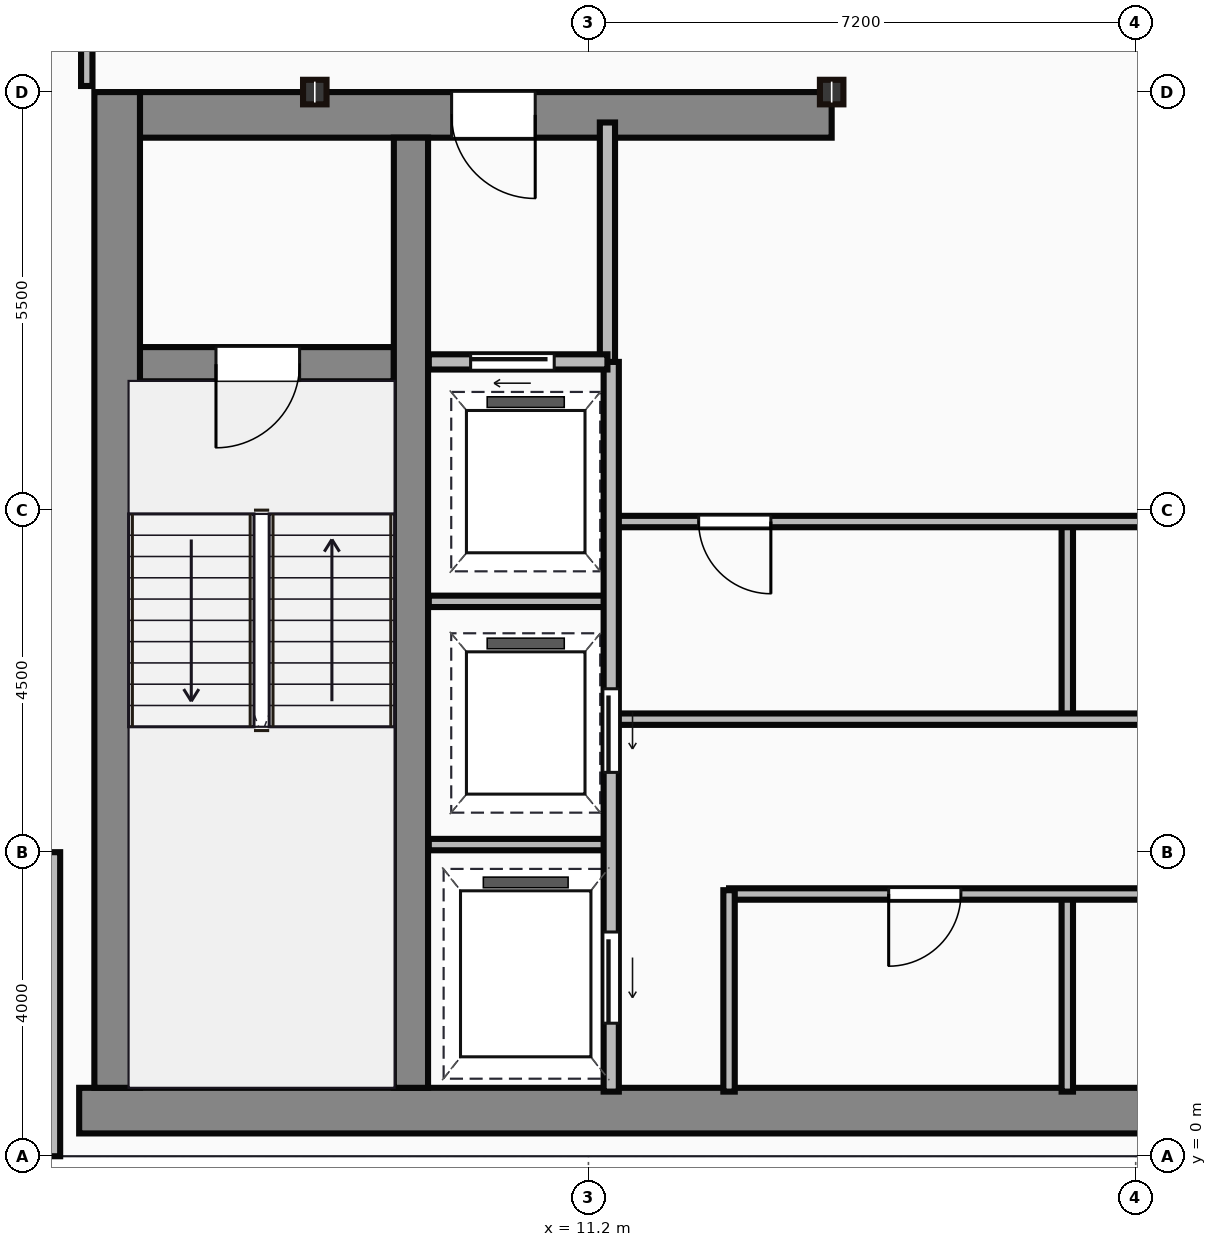
"""IFC4 building model, lengths in metres.
Left out: names, types, materials, properties, quantities, classifications, styles, units other than length and angle.
Written with IfcOpenShell. Run it as: python <this file> out.ifc"""

import sys

from ifc_helpers import new_model, si_unit, direction, frame, frame_2d, origin, origin_2d, place, context, subcontext, project, spatial, rectangle, i_section, extrude, source, transform, mapped, element, fill, save


model = new_model("IFC4")
c1 = context("Model", 3, precision=1e-05, world=origin(), true_north=direction((0.0, 1.0)))
c2 = subcontext(c1, "Body", "Model", "MODEL_VIEW")
j1 = project(units=[si_unit("LENGTHUNIT", "METRE"), si_unit("PLANEANGLEUNIT", "RADIAN")], contexts=[c1])
p1 = place(None, origin())
s1 = spatial("IfcSite", under=j1, at=p1, CompositionType="ELEMENT")
p2 = place(p1, origin())
s2 = spatial("IfcBuilding", under=s1, at=p2, CompositionType="ELEMENT")
p3 = place(p2, frame((0.0, 0.0, 232.4)))
s3 = spatial("IfcBuildingStorey", under=s2, at=p3, CompositionType="ELEMENT", Elevation=232.4)
m1 = source(origin(), c2, "Body", "SweptSolid", [
    extrude(rectangle(XDim=29.5, YDim=0.6, at=frame_2d((14.75, 0.0))), origin(), (0.0, 0.0, 1.0), 3.65),
])
p4 = place(p3, frame((4.5, 0.6, 0.0), z_axis=(0.0, 0.0, 1.0), x_axis=(1.0, 0.0, 0.0)))
e1 = element("IfcWall", 1, at=p4, inside=s3, PredefinedType="SHEAR", context=c2, shape_type="MappedRepresentation", body=[
    mapped(m1, transform((0.0, 0.0, 0.0))),
])
m2 = source(origin(), c2, "Body", "SweptSolid", [
    extrude(rectangle(XDim=13.1, YDim=0.6, at=frame_2d((6.55, 0.0))), origin(), (0.0, 0.0, 1.0), 3.65),
])
p5 = place(p3, frame((5.0, 0.9, 0.0), z_axis=(0.0, 0.0, 1.0), x_axis=(0.0, 1.0, 0.0)))
e2 = element("IfcWall", 2, at=p5, inside=s3, PredefinedType="SHEAR", context=c2, shape_type="MappedRepresentation", body=[
    mapped(m2, transform((0.0, 0.0, 0.0))),
])
m3 = source(origin(), c2, "Body", "SweptSolid", [
    extrude(rectangle(XDim=9.1, YDim=0.6, at=frame_2d((4.55, 0.0))), origin(), (0.0, 0.0, 1.0), 3.65),
])
p6 = place(p3, frame((5.3, 13.7, 0.0), z_axis=(0.0, 0.0, 1.0), x_axis=(1.0, 0.0, 0.0)))
e3 = element("IfcWall", 3, at=p6, inside=s3, PredefinedType="SHEAR", context=c2, shape_type="MappedRepresentation", body=[
    mapped(m3, transform((0.0, 0.0, 0.0))),
])
p7 = place(p6, frame((4.1, 0.0, 0.0)))
e4 = element("IfcOpeningElement", 4, at=p7, cuts=e3, PredefinedType="OPENING", context=c2, shape_type="SweptSolid", body=[
    extrude(rectangle(XDim=1.1, YDim=2.15, at=frame_2d((0.55, 1.075))), frame((0.0, 0.31, 0.0), z_axis=(0.0, -1.0, 0.0), x_axis=(1.0, 0.0, 0.0)), (0.0, 0.0, 1.0), 0.62),
])
m4 = source(origin(), c2, "Body", "SweptSolid", [
    extrude(rectangle(XDim=12.5, YDim=0.45, at=frame_2d((6.25, 0.0))), origin(), (0.0, 0.0, 1.0), 3.65),
])
p8 = place(p3, frame((8.865, 0.9, 0.0), z_axis=(0.0, 0.0, 1.0), x_axis=(0.0, 1.0, 0.0)))
e5 = element("IfcWall", 5, at=p8, inside=s3, PredefinedType="SHEAR", context=c2, shape_type="MappedRepresentation", body=[
    mapped(m4, transform((0.0, 0.0, 0.0))),
])
m5 = source(origin(), c2, "Body", "SweptSolid", [
    extrude(rectangle(XDim=3.39, YDim=0.45, at=frame_2d((1.695, 0.0))), origin(), (0.0, 0.0, 1.0), 3.65),
])
p9 = place(p3, frame((5.25, 10.42, 0.0), z_axis=(0.0, 0.0, 1.0), x_axis=(1.0, 0.0, 0.0)))
e6 = element("IfcWall", 6, at=p9, inside=s3, PredefinedType="SHEAR", context=c2, shape_type="MappedRepresentation", body=[
    mapped(m5, transform((0.0, 0.0, 0.0))),
])
p10 = place(p9, frame((1.05, 0.0, 0.0)))
e7 = element("IfcOpeningElement", 7, at=p10, cuts=e6, PredefinedType="OPENING", context=c2, shape_type="SweptSolid", body=[
    extrude(rectangle(XDim=1.1, YDim=2.15, at=frame_2d((0.55, 1.075))), frame((0.0, 0.235, 0.0), z_axis=(0.0, -1.0, 0.0), x_axis=(1.0, 0.0, 0.0)), (0.0, 0.0, 1.0), 0.47),
])
m6 = source(origin(), c2, "Body", "SweptSolid", [
    extrude(i_section(OverallWidth=0.309, OverallDepth=0.323, WebThickness=0.014, FlangeThickness=0.023, at=origin_2d()), origin(), (0.0, 0.0, 1.0), 3.65),
])
for number, where, z_axis, x_axis in (
    (8, (7.6, 14.0, 0.0), (0.0, 0.0, 1.0), (1.0, 0.0, 0.0)),
    (9, (14.4, 14.0, 0.0), (0.0, 0.0, 1.0), (1.0, 0.0, 0.0)),
):
    element("IfcColumn", number, at=place(p3, frame(where, z_axis=z_axis, x_axis=x_axis)), inside=s3, PredefinedType="COLUMN", context=c2, shape_type="MappedRepresentation", body=[
        mapped(m6, transform((0.0, 0.0, 0.0))),
    ])
m7 = source(origin(), c2, "Body", "SweptSolid", [
    extrude(rectangle(XDim=4.0, YDim=0.25, at=frame_2d((2.0, 0.0))), origin(), (0.0, 0.0, 1.0), 3.35),
])
p11 = place(p3, frame((4.125, 4.0, 0.0), z_axis=(0.0, 0.0, 1.0), x_axis=(0.0, -1.0, 0.0)))
e10 = element("IfcWall", 10, at=p11, inside=s3, PredefinedType="STANDARD", context=c2, shape_type="MappedRepresentation", body=[
    mapped(m7, transform((0.0, 0.0, 0.0))),
])
m8 = source(origin(), c2, "Body", "SweptSolid", [
    extrude(rectangle(XDim=3.18, YDim=0.2, at=frame_2d((1.59, 0.0))), origin(), (0.0, 0.0, 1.0), 3.35),
])
p12 = place(p3, frame((11.45, 10.42, 0.0), z_axis=(0.0, 0.0, 1.0), x_axis=(0.0, 1.0, 0.0)))
e11 = element("IfcWall", 11, at=p12, inside=s3, PredefinedType="PARTITIONING", context=c2, shape_type="MappedRepresentation", body=[
    mapped(m8, transform((0.0, 0.0, 0.0))),
])
m9 = source(origin(), c2, "Body", "SweptSolid", [
    extrude(rectangle(XDim=2.35, YDim=0.2, at=frame_2d((1.175, 0.0))), origin(), (0.0, 0.0, 1.0), 3.35),
])
p13 = place(p3, frame((9.1, 10.45, 0.0), z_axis=(0.0, 0.0, 1.0), x_axis=(1.0, 0.0, 0.0)))
e12 = element("IfcWall", 12, at=p13, inside=s3, PredefinedType="PARTITIONING", context=c2, shape_type="MappedRepresentation", body=[
    mapped(m9, transform((0.0, 0.0, 0.0))),
])
p14 = place(p13, frame((0.55, 0.0, 0.0)))
e13 = element("IfcOpeningElement", 13, at=p14, cuts=e12, PredefinedType="OPENING", context=c2, shape_type="SweptSolid", body=[
    extrude(rectangle(XDim=1.1, YDim=2.15, at=frame_2d((0.55, 1.075))), frame((0.0, 0.11, 0.0), z_axis=(0.0, -1.0, 0.0), x_axis=(1.0, 0.0, 0.0)), (0.0, 0.0, 1.0), 0.22),
])
m10 = source(origin(), c2, "Body", "SweptSolid", [
    extrude(rectangle(XDim=9.6, YDim=0.2, at=frame_2d((4.8, 0.0))), origin(), (0.0, 0.0, 1.0), 3.35),
])
p15 = place(p3, frame((11.5, 0.85, 0.0), z_axis=(0.0, 0.0, 1.0), x_axis=(0.0, 1.0, 0.0)))
e14 = element("IfcWall", 14, at=p15, inside=s3, PredefinedType="PARTITIONING", context=c2, shape_type="MappedRepresentation", body=[
    mapped(m10, transform((0.0, 0.0, 0.0))),
])
p16 = place(p15, frame((4.2, 0.0, 0.0)))
e15 = element("IfcOpeningElement", 15, at=p16, cuts=e14, PredefinedType="OPENING", context=c2, shape_type="SweptSolid", body=[
    extrude(rectangle(XDim=1.1, YDim=2.15, at=frame_2d((0.55, 1.075))), frame((0.0, 0.11, 0.0), z_axis=(0.0, -1.0, 0.0), x_axis=(1.0, 0.0, 0.0)), (0.0, 0.0, 1.0), 0.22),
])
p17 = place(p15, frame((0.9, 0.0, 0.0)))
e16 = element("IfcOpeningElement", 16, at=p17, cuts=e14, PredefinedType="OPENING", context=c2, shape_type="SweptSolid", body=[
    extrude(rectangle(XDim=1.2, YDim=2.15, at=frame_2d((0.6, 1.075))), frame((0.0, 0.11, 0.0), z_axis=(0.0, -1.0, 0.0), x_axis=(1.0, 0.0, 0.0)), (0.0, 0.0, 1.0), 0.22),
])
m11 = source(origin(), c2, "Body", "SweptSolid", [
    extrude(rectangle(XDim=2.4, YDim=0.15, at=frame_2d((1.2, 0.0))), origin(), (0.0, 0.0, 1.0), 3.35),
])
for number, where, z_axis, x_axis in (
    (17, (9.1, 4.1, 0.0), (0.0, 0.0, 1.0), (1.0, 0.0, 0.0)),
    (18, (9.1, 7.3, 0.0), (0.0, 0.0, 1.0), (1.0, 0.0, 0.0)),
):
    element("IfcWall", number, at=place(p3, frame(where, z_axis=z_axis, x_axis=x_axis)), inside=s3, PredefinedType="PARTITIONING", context=c2, shape_type="MappedRepresentation", body=[
        mapped(m11, transform((0.0, 0.0, 0.0))),
    ])
m12 = source(origin(), c2, "Body", "SweptSolid", [
    extrude(rectangle(XDim=2.65, YDim=0.15, at=frame_2d((1.325, 0.0))), origin(), (0.0, 0.0, 1.0), 3.35),
])
p18 = place(p3, frame((13.05, 0.85, 0.0), z_axis=(0.0, 0.0, 1.0), x_axis=(0.0, 1.0, 0.0)))
e19 = element("IfcWall", 19, at=p18, inside=s3, PredefinedType="PARTITIONING", context=c2, shape_type="MappedRepresentation", body=[
    mapped(m12, transform((0.0, 0.0, 0.0))),
])
m13 = source(origin(), c2, "Body", "SweptSolid", [
    extrude(rectangle(XDim=10.35, YDim=0.15, at=frame_2d((5.175, 0.0))), origin(), (0.0, 0.0, 1.0), 3.35),
])
p19 = place(p3, frame((13.05, 3.45, 0.0), z_axis=(0.0, 0.0, 1.0), x_axis=(1.0, 0.0, 0.0)))
e20 = element("IfcWall", 20, at=p19, inside=s3, PredefinedType="PARTITIONING", context=c2, shape_type="MappedRepresentation", body=[
    mapped(m13, transform((0.0, 0.0, 0.0))),
])
p20 = place(p19, frame((2.1, 0.0, 0.0)))
e21 = element("IfcOpeningElement", 21, at=p20, cuts=e20, PredefinedType="OPENING", context=c2, shape_type="SweptSolid", body=[
    extrude(rectangle(XDim=0.95, YDim=2.15, at=frame_2d((0.475, 1.075))), frame((0.0, 0.085, 0.0), z_axis=(0.0, -1.0, 0.0), x_axis=(1.0, 0.0, 0.0)), (0.0, 0.0, 1.0), 0.17),
])
p21 = place(p19, frame((6.8, 0.0, 0.0)))
e22 = element("IfcOpeningElement", 22, at=p21, cuts=e20, PredefinedType="OPENING", context=c2, shape_type="SweptSolid", body=[
    extrude(rectangle(XDim=0.95, YDim=2.15, at=frame_2d((0.475, 1.075))), frame((0.0, 0.085, 0.0), z_axis=(0.0, -1.0, 0.0), x_axis=(1.0, 0.0, 0.0)), (0.0, 0.0, 1.0), 0.17),
])
m14 = source(origin(), c2, "Body", "SweptSolid", [
    extrude(rectangle(XDim=2.6, YDim=0.15, at=frame_2d((1.3, 0.0))), origin(), (0.0, 0.0, 1.0), 3.35),
])
p22 = place(p3, frame((17.5, 0.85, 0.0), z_axis=(0.0, 0.0, 1.0), x_axis=(0.0, 1.0, 0.0)))
e23 = element("IfcWall", 23, at=p22, inside=s3, PredefinedType="PARTITIONING", context=c2, shape_type="MappedRepresentation", body=[
    mapped(m14, transform((0.0, 0.0, 0.0))),
])
m15 = source(origin(), c2, "Body", "SweptSolid", [
    extrude(rectangle(XDim=11.85, YDim=0.15, at=frame_2d((5.925, 0.0))), origin(), (0.0, 0.0, 1.0), 3.35),
])
p23 = place(p3, frame((11.55, 5.75, 0.0), z_axis=(0.0, 0.0, 1.0), x_axis=(1.0, 0.0, 0.0)))
e24 = element("IfcWall", 24, at=p23, inside=s3, PredefinedType="PARTITIONING", context=c2, shape_type="MappedRepresentation", body=[
    mapped(m15, transform((0.0, 0.0, 0.0))),
])
p24 = place(p3, frame((11.55, 8.35, 0.0), z_axis=(0.0, 0.0, 1.0), x_axis=(1.0, 0.0, 0.0)))
e25 = element("IfcWall", 25, at=p24, inside=s3, PredefinedType="PARTITIONING", context=c2, shape_type="MappedRepresentation", body=[
    mapped(m15, transform((0.0, 0.0, 0.0))),
])
p25 = place(p24, frame((1.1, 0.0, 0.0)))
e26 = element("IfcOpeningElement", 26, at=p25, cuts=e25, PredefinedType="OPENING", context=c2, shape_type="SweptSolid", body=[
    extrude(rectangle(XDim=0.95, YDim=2.15, at=frame_2d((0.475, 1.075))), frame((0.0, 0.085, 0.0), z_axis=(0.0, -1.0, 0.0), x_axis=(1.0, 0.0, 0.0)), (0.0, 0.0, 1.0), 0.17),
])
p26 = place(p24, frame((9.4, 0.0, 0.0)))
e27 = element("IfcOpeningElement", 27, at=p26, cuts=e25, PredefinedType="OPENING", context=c2, shape_type="SweptSolid", body=[
    extrude(rectangle(XDim=0.95, YDim=2.15, at=frame_2d((0.475, 1.075))), frame((0.0, 0.085, 0.0), z_axis=(0.0, -1.0, 0.0), x_axis=(1.0, 0.0, 0.0)), (0.0, 0.0, 1.0), 0.17),
])
m16 = source(origin(), c2, "Body", "SweptSolid", [
    extrude(rectangle(XDim=2.5, YDim=0.15, at=frame_2d((1.25, 0.0))), origin(), (0.0, 0.0, 1.0), 3.35),
])
p27 = place(p3, frame((17.5, 5.8, 0.0), z_axis=(0.0, 0.0, 1.0), x_axis=(0.0, 1.0, 0.0)))
e28 = element("IfcWall", 28, at=p27, inside=s3, PredefinedType="PARTITIONING", context=c2, shape_type="MappedRepresentation", body=[
    mapped(m16, transform((0.0, 0.0, 0.0))),
])
m17 = source(origin(), c2, "Body", "SweptSolid", [
    extrude(rectangle(XDim=2.12, YDim=0.15, at=frame_2d((1.06, 0.0))), origin(), (0.0, 0.0, 1.0), 3.35),
])
p28 = place(p3, frame((4.6, 14.08, 0.0), z_axis=(0.0, 0.0, 1.0), x_axis=(0.0, 1.0, 0.0)))
e29 = element("IfcWall", 29, at=p28, inside=s3, PredefinedType="PARTITIONING", context=c2, shape_type="MappedRepresentation", body=[
    mapped(m17, transform((0.0, 0.0, 0.0))),
])
m18 = source(origin(), c2, "Body", "SweptSolid", [
    extrude(rectangle(XDim=1.1, YDim=2.15, at=frame_2d((0.55, 1.075))), frame((0.0, 0.025, 0.0), z_axis=(0.0, -1.0, 0.0), x_axis=(1.0, 0.0, 0.0)), (0.0, 0.0, 1.0), 0.05),
])
p29 = place(p10, frame((1.1, 0.0, 0.0), z_axis=(0.0, 0.0, 1.0), x_axis=(-1.0, 0.0, 0.0)))
e30 = element("IfcDoor", 30, at=p29, inside=s3, OperationType="SINGLE_SWING_LEFT", PredefinedType="DOOR", context=c2, shape_type="MappedRepresentation", body=[
    mapped(m18, transform((0.0, 0.0, 0.0))),
])
fill(e7, e30)
p30 = place(p7, origin())
e31 = element("IfcDoor", 31, at=p30, inside=s3, OperationType="SINGLE_SWING_RIGHT", PredefinedType="DOOR", context=c2, shape_type="MappedRepresentation", body=[
    mapped(m18, transform((0.0, 0.0, 0.0))),
])
fill(e4, e31)
p31 = place(p14, origin())
e32 = element("IfcDoor", 32, at=p31, inside=s3, OperationType="SLIDING_TO_LEFT", PredefinedType="DOOR", context=c2, shape_type="MappedRepresentation", body=[
    mapped(m18, transform((0.0, 0.0, 0.0))),
])
fill(e13, e32)
p32 = place(p16, frame((1.1, 0.0, 0.0), z_axis=(0.0, 0.0, 1.0), x_axis=(-1.0, 0.0, 0.0)))
e33 = element("IfcDoor", 33, at=p32, inside=s3, OperationType="SLIDING_TO_LEFT", PredefinedType="DOOR", context=c2, shape_type="MappedRepresentation", body=[
    mapped(m18, transform((0.0, 0.0, 0.0))),
])
fill(e15, e33)
m19 = source(origin(), c2, "Body", "SweptSolid", [
    extrude(rectangle(XDim=1.2, YDim=2.15, at=frame_2d((0.6, 1.075))), frame((0.0, 0.025, 0.0), z_axis=(0.0, -1.0, 0.0), x_axis=(1.0, 0.0, 0.0)), (0.0, 0.0, 1.0), 0.05),
])
p33 = place(p17, frame((1.2, 0.0, 0.0), z_axis=(0.0, 0.0, 1.0), x_axis=(-1.0, 0.0, 0.0)))
e34 = element("IfcDoor", 34, at=p33, inside=s3, OperationType="SLIDING_TO_LEFT", PredefinedType="DOOR", context=c2, shape_type="MappedRepresentation", body=[
    mapped(m19, transform((0.0, 0.0, 0.0))),
])
fill(e16, e34)
m20 = source(origin(), c2, "Body", "SweptSolid", [
    extrude(rectangle(XDim=0.95, YDim=2.15, at=frame_2d((0.475, 1.075))), frame((0.0, 0.025, 0.0), z_axis=(0.0, -1.0, 0.0), x_axis=(1.0, 0.0, 0.0)), (0.0, 0.0, 1.0), 0.05),
])
p34 = place(p20, origin())
e35 = element("IfcDoor", 35, at=p34, inside=s3, OperationType="SINGLE_SWING_LEFT", PredefinedType="DOOR", context=c2, shape_type="MappedRepresentation", body=[
    mapped(m20, transform((0.0, 0.0, 0.0))),
])
fill(e21, e35)
p35 = place(p25, origin())
e36 = element("IfcDoor", 36, at=p35, inside=s3, OperationType="SINGLE_SWING_RIGHT", PredefinedType="DOOR", context=c2, shape_type="MappedRepresentation", body=[
    mapped(m20, transform((0.0, 0.0, 0.0))),
])
fill(e26, e36)
save(model, sys.argv[1])
